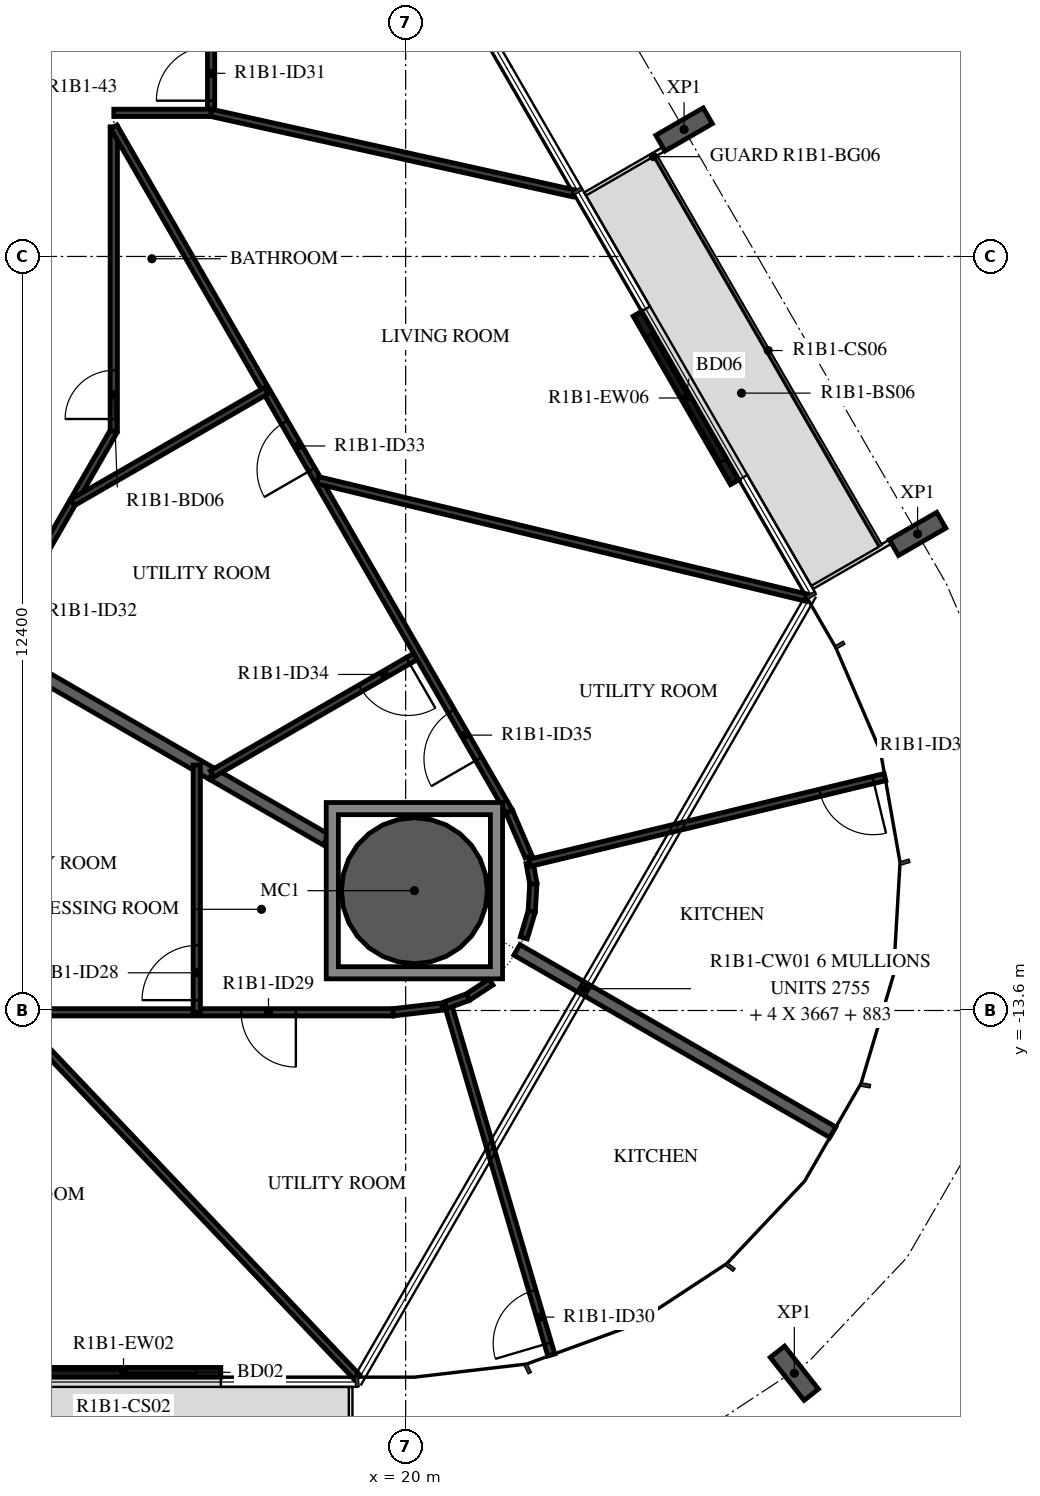
"""IFC4 building model, lengths in metres.
Left out: names, types, materials, properties, quantities, classifications, styles, units other than length and angle.
Written with IfcOpenShell. Run it as: python <this file> out.ifc"""

import sys

from ifc_helpers import new_model, si_unit, direction, frame, frame_2d, origin, origin_2d, place, context, subcontext, project, spatial, polyline, rectangle, hollow_circle, i_section, outline, extrude, element, fill, save


model = new_model("IFC4")
c1 = context("Model", 3, precision=1e-05, world=origin(), true_north=direction((0.0, 1.0)))
c2 = subcontext(c1, "Body", "Model", "MODEL_VIEW")
j1 = project(units=[si_unit("LENGTHUNIT", "METRE"), si_unit("PLANEANGLEUNIT", "RADIAN")], contexts=[c1])
p1 = place(None, origin())
s1 = spatial("IfcSite", under=j1, at=p1, CompositionType="ELEMENT")
p2 = place(p1, origin())
s2 = spatial("IfcBuilding", under=s1, at=p2, CompositionType="ELEMENT")
p3 = place(p2, frame((0.0, 0.0, 48.9)))
s3 = spatial("IfcBuildingStorey", under=s2, at=p3, CompositionType="ELEMENT", Elevation=48.9)
p4 = place(p3, frame((20.144, -11.63, -0.38), z_axis=(0.0, 0.0, 1.0), x_axis=(1.0, 0.0, 0.0)))
e1 = element("IfcColumn", 1, at=p4, inside=s3, PredefinedType="COLUMN", context=c2, shape_type="SweptSolid", body=[
    extrude(hollow_circle(Radius=1.2, WallThickness=0.06, at=origin_2d()), origin(), (0.0, 0.0, 1.0), 3.5),
])
for number, where, z_axis, x_axis in (
    (2, (26.392, -19.565, -0.38), (0.0, 0.0, 1.0), (-0.786, -0.619, 0.0)),
    (3, (28.419, -5.763, -0.38), (0.0, 0.0, 1.0), (0.5, -0.866, 0.0)),
    (4, (24.579, 0.888, -0.38), (0.0, 0.0, 1.0), (0.5, -0.866, 0.0)),
):
    element("IfcColumn", number, at=place(p3, frame(where, z_axis=z_axis, x_axis=x_axis)), inside=s3, PredefinedType="COLUMN", context=c2, shape_type="SweptSolid", body=[
        extrude(i_section(OverallWidth=0.3, OverallDepth=0.9, WebThickness=0.019, FlangeThickness=0.035, FilletRadius=0.03, at=origin_2d()), origin(), (0.0, 0.0, 1.0), 3.5),
    ])
p5 = place(p3, frame((25.411, -4.913, 0.0), z_axis=(0.0, 0.0, 1.0), x_axis=(-0.500028443584, 0.866008981251, 0.0)))
e5 = element("IfcWall", 5, at=p5, inside=s3, PredefinedType="STANDARD", context=c2, shape_type="SweptSolid", body=[
    extrude(rectangle(XDim=3.2, YDim=0.16, at=frame_2d((1.6, 0.0))), origin(), (0.0, 0.0, 1.0), 3.12),
])
p6 = place(p5, frame((0.4, 0.0, 0.0)))
e6 = element("IfcOpeningElement", 6, at=p6, cuts=e5, PredefinedType="OPENING", context=c2, shape_type="SweptSolid", body=[
    extrude(rectangle(XDim=2.4, YDim=2.4, at=frame_2d((1.2, 1.2))), frame((0.0, 0.09, 0.0), z_axis=(0.0, -1.0, 0.0), x_axis=(1.0, 0.0, 0.0)), (0.0, 0.0, 1.0), 0.18),
])
p7 = place(p3, frame((13.76, -19.55, 0.0), z_axis=(0.0, 0.0, 1.0), x_axis=(1.0, 0.0, 0.0)))
e7 = element("IfcWall", 7, at=p7, inside=s3, PredefinedType="STANDARD", context=c2, shape_type="SweptSolid", body=[
    extrude(rectangle(XDim=3.2, YDim=0.16, at=frame_2d((1.6, 0.0))), origin(), (0.0, 0.0, 1.0), 3.12),
])
p8 = place(p7, frame((0.4, 0.0, 0.0)))
e8 = element("IfcOpeningElement", 8, at=p8, cuts=e7, PredefinedType="OPENING", context=c2, shape_type="SweptSolid", body=[
    extrude(rectangle(XDim=2.4, YDim=2.4, at=frame_2d((1.2, 1.2))), frame((0.0, 0.09, 0.0), z_axis=(0.0, -1.0, 0.0), x_axis=(1.0, 0.0, 0.0)), (0.0, 0.0, 1.0), 0.18),
])
p9 = place(p3, frame((16.817, -9.709, 0.0), z_axis=(0.0, 0.0, 1.0), x_axis=(-0.86604338933, 0.499968846828, 0.0)))
e9 = element("IfcWall", 9, at=p9, inside=s3, PredefinedType="STANDARD", context=c2, shape_type="SweptSolid", body=[
    extrude(rectangle(XDim=5.718, YDim=0.2, at=frame_2d((2.859, 0.0))), origin(), (0.0, 0.0, 1.0), 3.12),
])
p10 = place(p3, frame((27.025, -15.603, 0.0), z_axis=(0.0, 0.0, 1.0), x_axis=(-0.866020924479, 0.500007758305, 0.0)))
e10 = element("IfcWall", 10, at=p10, inside=s3, PredefinedType="STANDARD", context=c2, shape_type="SweptSolid", body=[
    extrude(rectangle(XDim=6.0, YDim=0.2, at=frame_2d((3.0, 0.0))), origin(), (0.0, 0.0, 1.0), 3.12),
])
p11 = place(p3, frame((18.694, -10.793, 0.0), z_axis=(0.0, 0.0, 1.0), x_axis=(-0.866009251978, 0.500027974705, 0.0)))
e11 = element("IfcWall", 11, at=p11, inside=s3, PredefinedType="STANDARD", context=c2, shape_type="SweptSolid", body=[
    extrude(rectangle(XDim=2.167, YDim=0.2, at=frame_2d((1.084, 0.0))), origin(), (0.0, 0.0, 1.0), 3.12),
])
p12 = place(p3, frame((11.127, -11.127, 0.0), z_axis=(0.0, 0.0, 1.0), x_axis=(0.499987950692, 0.866032360344, 0.0)))
e12 = element("IfcWall", 12, at=p12, inside=s3, PredefinedType="PARTITIONING", context=c2, shape_type="SweptSolid", body=[
    extrude(rectangle(XDim=8.146, YDim=0.12, at=frame_2d((4.073, 0.0))), origin(), (0.0, 0.0, 1.0), 3.12),
])
p13 = place(p12, frame((1.303, 0.0, 0.0)))
e13 = element("IfcOpeningElement", 13, at=p13, cuts=e12, PredefinedType="OPENING", context=c2, shape_type="SweptSolid", body=[
    extrude(rectangle(XDim=0.9, YDim=2.1, at=frame_2d((0.45, 1.05))), frame((0.0, 0.07, 0.0), z_axis=(0.0, -1.0, 0.0), x_axis=(1.0, 0.0, 0.0)), (0.0, 0.0, 1.0), 0.14),
])
p14 = place(p12, frame((4.273, 0.0, 0.0)))
e14 = element("IfcOpeningElement", 14, at=p14, cuts=e12, PredefinedType="OPENING", context=c2, shape_type="SweptSolid", body=[
    extrude(rectangle(XDim=0.9, YDim=2.1, at=frame_2d((0.45, 1.05))), frame((0.0, 0.07, 0.0), z_axis=(0.0, -1.0, 0.0), x_axis=(1.0, 0.0, 0.0)), (0.0, 0.0, 1.0), 0.14),
])
p15 = place(p3, frame((19.2, -19.63, 0.0), z_axis=(0.0, 0.0, 1.0), x_axis=(-0.688544699396, 0.72519390299, 0.0)))
e15 = element("IfcWall", 15, at=p15, inside=s3, PredefinedType="PARTITIONING", context=c2, shape_type="SweptSolid", body=[
    extrude(rectangle(XDim=8.274, YDim=0.12, at=frame_2d((4.137, 0.0))), origin(), (0.0, 0.0, 1.0), 3.12),
])
p16 = place(p3, frame((19.794, -13.63, 0.0), z_axis=(0.0, 0.0, 1.0), x_axis=(-1.0, 0.0, 0.0)))
e16 = element("IfcWall", 16, at=p16, inside=s3, PredefinedType="PARTITIONING", context=c2, shape_type="SweptSolid", body=[
    extrude(rectangle(XDim=8.116, YDim=0.12, at=frame_2d((4.058, 0.0))), origin(), (0.0, 0.0, 1.0), 3.12),
])
p17 = place(p16, frame((6.436, 0.0, 0.0)))
e17 = element("IfcOpeningElement", 17, at=p17, cuts=e16, PredefinedType="OPENING", context=c2, shape_type="SweptSolid", body=[
    extrude(rectangle(XDim=0.9, YDim=2.1, at=frame_2d((0.45, 1.05))), frame((0.0, 0.07, 0.0), z_axis=(0.0, -1.0, 0.0), x_axis=(1.0, 0.0, 0.0)), (0.0, 0.0, 1.0), 0.14),
])
p18 = place(p16, frame((1.6, 0.0, 0.0)))
e18 = element("IfcOpeningElement", 18, at=p18, cuts=e16, PredefinedType="OPENING", context=c2, shape_type="SweptSolid", body=[
    extrude(rectangle(XDim=0.9, YDim=2.1, at=frame_2d((0.45, 1.05))), frame((0.0, 0.07, 0.0), z_axis=(0.0, -1.0, 0.0), x_axis=(1.0, 0.0, 0.0)), (0.0, 0.0, 1.0), 0.14),
])
p19 = place(p3, frame((22.396, -19.266, 0.0), z_axis=(0.0, 0.0, 1.0), x_axis=(-0.282896205585, 0.959150528783, 0.0)))
e19 = element("IfcWall", 19, at=p19, inside=s3, PredefinedType="PARTITIONING", context=c2, shape_type="SweptSolid", body=[
    extrude(rectangle(XDim=6.012, YDim=0.12, at=frame_2d((3.006, 0.0))), origin(), (0.0, 0.0, 1.0), 3.12),
])
p20 = place(p19, frame((0.2, 0.0, 0.0)))
e20 = element("IfcOpeningElement", 20, at=p20, cuts=e19, PredefinedType="OPENING", context=c2, shape_type="SweptSolid", body=[
    extrude(rectangle(XDim=0.9, YDim=2.1, at=frame_2d((0.45, 1.05))), frame((0.0, 0.07, 0.0), z_axis=(0.0, -1.0, 0.0), x_axis=(1.0, 0.0, 0.0)), (0.0, 0.0, 1.0), 0.14),
])
p21 = place(p3, frame((20.595, -13.536, 0.0), z_axis=(0.0, 0.0, 1.0), x_axis=(-0.993259655268, -0.115910556968, 0.0)))
e21 = element("IfcWall", 21, at=p21, inside=s3, PredefinedType="PARTITIONING", context=c2, shape_type="SweptSolid", body=[
    extrude(rectangle(XDim=0.807, YDim=0.12, at=frame_2d((0.403, 0.0))), origin(), (0.0, 0.0, 1.0), 3.12),
])
p22 = place(p3, frame((16.565, -13.63, 0.0), z_axis=(0.0, 0.0, 1.0), x_axis=(0.0, 1.0, 0.0)))
e22 = element("IfcWall", 22, at=p22, inside=s3, PredefinedType="PARTITIONING", context=c2, shape_type="SweptSolid", body=[
    extrude(rectangle(XDim=4.066, YDim=0.12, at=frame_2d((2.033, 0.0))), origin(), (0.0, 0.0, 1.0), 3.12),
])
p23 = place(p22, frame((0.2, 0.0, 0.0)))
e23 = element("IfcOpeningElement", 23, at=p23, cuts=e22, PredefinedType="OPENING", context=c2, shape_type="SweptSolid", body=[
    extrude(rectangle(XDim=0.9, YDim=2.1, at=frame_2d((0.45, 1.05))), frame((0.0, 0.07, 0.0), z_axis=(0.0, -1.0, 0.0), x_axis=(1.0, 0.0, 0.0)), (0.0, 0.0, 1.0), 0.14),
])
p24 = place(p3, frame((21.403, -13.131, 0.0), z_axis=(0.0, 0.0, 1.0), x_axis=(-0.835339231854, -0.549734815821, 0.0)))
e24 = element("IfcWall", 24, at=p24, inside=s3, PredefinedType="PARTITIONING", context=c2, shape_type="SweptSolid", body=[
    extrude(rectangle(XDim=0.455, YDim=0.12, at=frame_2d((0.228, 0.0))), origin(), (0.0, 0.0, 1.0), 3.12),
])
p25 = place(p3, frame((21.023, -13.381, 0.0), z_axis=(0.0, 0.0, 1.0), x_axis=(-0.939665068469, -0.34209583321, 0.0)))
e25 = element("IfcWall", 25, at=p25, inside=s3, PredefinedType="PARTITIONING", context=c2, shape_type="SweptSolid", body=[
    extrude(rectangle(XDim=0.389, YDim=0.12, at=frame_2d((0.194, 0.0))), origin(), (0.0, 0.0, 1.0), 3.12),
])
p26 = place(p3, frame((16.8, 1.162, 0.0), z_axis=(0.0, 0.0, 1.0), x_axis=(0.0, 1.0, 0.0)))
e26 = element("IfcWall", 26, at=p26, inside=s3, PredefinedType="PARTITIONING", context=c2, shape_type="SweptSolid", body=[
    extrude(rectangle(XDim=1.7, YDim=0.12, at=frame_2d((0.85, 0.0))), origin(), (0.0, 0.0, 1.0), 3.12),
])
p27 = place(p26, frame((0.2, 0.0, 0.0)))
e27 = element("IfcOpeningElement", 27, at=p27, cuts=e26, PredefinedType="OPENING", context=c2, shape_type="SweptSolid", body=[
    extrude(rectangle(XDim=0.9, YDim=2.1, at=frame_2d((0.45, 1.05))), frame((0.0, 0.07, 0.0), z_axis=(0.0, -1.0, 0.0), x_axis=(1.0, 0.0, 0.0)), (0.0, 0.0, 1.0), 0.14),
])
p28 = place(p3, frame((15.2, -4.073, 0.0), z_axis=(0.0, 0.0, 1.0), x_axis=(0.0, 1.0, 0.0)))
e28 = element("IfcWall", 28, at=p28, inside=s3, PredefinedType="PARTITIONING", context=c2, shape_type="SweptSolid", body=[
    extrude(rectangle(XDim=5.005, YDim=0.12, at=frame_2d((2.503, 0.0))), origin(), (0.0, 0.0, 1.0), 3.12),
])
p29 = place(p28, frame((0.2, 0.0, 0.0)))
e29 = element("IfcOpeningElement", 29, at=p29, cuts=e28, PredefinedType="OPENING", context=c2, shape_type="SweptSolid", body=[
    extrude(rectangle(XDim=0.8, YDim=2.1, at=frame_2d((0.4, 1.05))), frame((0.0, 0.07, 0.0), z_axis=(0.0, -1.0, 0.0), x_axis=(1.0, 0.0, 0.0)), (0.0, 0.0, 1.0), 0.14),
])
p30 = place(p3, frame((15.2, 1.162, 0.0), z_axis=(0.0, 0.0, 1.0), x_axis=(1.0, 0.0, 0.0)))
e30 = element("IfcWall", 30, at=p30, inside=s3, PredefinedType="PARTITIONING", context=c2, shape_type="SweptSolid", body=[
    extrude(rectangle(XDim=1.6, YDim=0.12, at=frame_2d((0.8, 0.0))), origin(), (0.0, 0.0, 1.0), 3.12),
])
p31 = place(p3, frame((16.8, 1.162, 0.0), z_axis=(0.0, 0.0, 1.0), x_axis=(0.976218101949, -0.216790722652, 0.0)))
e31 = element("IfcWall", 31, at=p31, inside=s3, PredefinedType="PARTITIONING", context=c2, shape_type="SweptSolid", body=[
    extrude(rectangle(XDim=6.105, YDim=0.12, at=frame_2d((3.052, 0.0))), origin(), (0.0, 0.0, 1.0), 3.12),
])
p32 = place(p3, frame((21.942, -12.406, 0.0), z_axis=(0.0, 0.0, 1.0), x_axis=(0.287101711529, 0.957900102953, 0.0)))
e32 = element("IfcWall", 32, at=p32, inside=s3, PredefinedType="PARTITIONING", context=c2, shape_type="SweptSolid", body=[
    extrude(rectangle(XDim=0.455, YDim=0.12, at=frame_2d((0.228, 0.0))), origin(), (0.0, 0.0, 1.0), 3.12),
])
p33 = place(p3, frame((22.073, -11.97, 0.0), z_axis=(0.0, 0.0, 1.0), x_axis=(0.058533144572, 0.998285465679, 0.0)))
e33 = element("IfcWall", 33, at=p33, inside=s3, PredefinedType="PARTITIONING", context=c2, shape_type="SweptSolid", body=[
    extrude(rectangle(XDim=0.455, YDim=0.12, at=frame_2d((0.227, 0.0))), origin(), (0.0, 0.0, 1.0), 3.12),
])
p34 = place(p3, frame((22.1, -11.516, 0.0), z_axis=(0.0, 0.0, 1.0), x_axis=(-0.174264410128, 0.984698895786, 0.0)))
e34 = element("IfcWall", 34, at=p34, inside=s3, PredefinedType="PARTITIONING", context=c2, shape_type="SweptSolid", body=[
    extrude(rectangle(XDim=0.349, YDim=0.12, at=frame_2d((0.174, 0.0))), origin(), (0.0, 0.0, 1.0), 3.12),
])
p35 = place(p3, frame((20.212, -7.749, 0.0), z_axis=(0.0, 0.0, 1.0), x_axis=(-0.86604663799, -0.499963219473, 0.0)))
e35 = element("IfcWall", 35, at=p35, inside=s3, PredefinedType="PARTITIONING", context=c2, shape_type="SweptSolid", body=[
    extrude(rectangle(XDim=3.921, YDim=0.12, at=frame_2d((1.96, 0.0))), origin(), (0.0, 0.0, 1.0), 3.12),
])
p36 = place(p35, frame((0.2, 0.0, 0.0)))
e36 = element("IfcOpeningElement", 36, at=p36, cuts=e35, PredefinedType="OPENING", context=c2, shape_type="SweptSolid", body=[
    extrude(rectangle(XDim=0.9, YDim=2.1, at=frame_2d((0.45, 1.05))), frame((0.0, 0.07, 0.0), z_axis=(0.0, -1.0, 0.0), x_axis=(1.0, 0.0, 0.0)), (0.0, 0.0, 1.0), 0.14),
])
p37 = place(p3, frame((22.021, -11.068, 0.0), z_axis=(0.0, 0.0, 1.0), x_axis=(-0.396036092975, 0.918234944369, 0.0)))
e37 = element("IfcWall", 37, at=p37, inside=s3, PredefinedType="PARTITIONING", context=c2, shape_type="SweptSolid", body=[
    extrude(rectangle(XDim=0.807, YDim=0.12, at=frame_2d((0.403, 0.0))), origin(), (0.0, 0.0, 1.0), 3.12),
])
p38 = place(p3, frame((21.701, -10.327, 0.0), z_axis=(0.0, 0.0, 1.0), x_axis=(-0.500008528526, 0.866020479782, 0.0)))
e38 = element("IfcWall", 38, at=p38, inside=s3, PredefinedType="PARTITIONING", context=c2, shape_type="SweptSolid", body=[
    extrude(rectangle(XDim=13.002, YDim=0.12, at=frame_2d((6.501, 0.0))), origin(), (0.0, 0.0, 1.0), 3.12),
])
p39 = place(p38, frame((6.49, 0.0, 0.0)))
e39 = element("IfcOpeningElement", 39, at=p39, cuts=e38, PredefinedType="OPENING", context=c2, shape_type="SweptSolid", body=[
    extrude(rectangle(XDim=0.9, YDim=2.1, at=frame_2d((0.45, 1.05))), frame((0.0, 0.07, 0.0), z_axis=(0.0, -1.0, 0.0), x_axis=(1.0, 0.0, 0.0)), (0.0, 0.0, 1.0), 0.14),
])
p40 = place(p38, frame((1.0, 0.0, 0.0)))
e40 = element("IfcOpeningElement", 40, at=p40, cuts=e38, PredefinedType="OPENING", context=c2, shape_type="SweptSolid", body=[
    extrude(rectangle(XDim=0.9, YDim=2.1, at=frame_2d((0.45, 1.05))), frame((0.0, 0.07, 0.0), z_axis=(0.0, -1.0, 0.0), x_axis=(1.0, 0.0, 0.0)), (0.0, 0.0, 1.0), 0.14),
])
p41 = place(p3, frame((27.883, -9.762, 0.0), z_axis=(0.0, 0.0, 1.0), x_axis=(-0.972090512558, -0.234606128213, 0.0)))
e41 = element("IfcWall", 41, at=p41, inside=s3, PredefinedType="PARTITIONING", context=c2, shape_type="SweptSolid", body=[
    extrude(rectangle(XDim=6.012, YDim=0.12, at=frame_2d((3.006, 0.0))), origin(), (0.0, 0.0, 1.0), 3.12),
])
p42 = place(p41, frame((0.2, 0.0, 0.0)))
e42 = element("IfcOpeningElement", 42, at=p42, cuts=e41, PredefinedType="OPENING", context=c2, shape_type="SweptSolid", body=[
    extrude(rectangle(XDim=0.9, YDim=2.1, at=frame_2d((0.45, 1.05))), frame((0.0, 0.07, 0.0), z_axis=(0.0, -1.0, 0.0), x_axis=(1.0, 0.0, 0.0)), (0.0, 0.0, 1.0), 0.14),
])
p43 = place(p3, frame((17.706, -3.408, 0.0), z_axis=(0.0, 0.0, 1.0), x_axis=(-0.866027421574, -0.49999650507, 0.0)))
e43 = element("IfcWall", 43, at=p43, inside=s3, PredefinedType="PARTITIONING", context=c2, shape_type="SweptSolid", body=[
    extrude(rectangle(XDim=3.676, YDim=0.12, at=frame_2d((1.838, 0.0))), origin(), (0.0, 0.0, 1.0), 3.12),
])
p44 = place(p3, frame((26.6, -6.813, 0.0), z_axis=(0.0, 0.0, 1.0), x_axis=(-0.972306888212, 0.233707755831, 0.0)))
e44 = element("IfcWall", 44, at=p44, inside=s3, PredefinedType="PARTITIONING", context=c2, shape_type="SweptSolid", body=[
    extrude(rectangle(XDim=8.273, YDim=0.12, at=frame_2d((4.137, 0.0))), origin(), (0.0, 0.0, 1.0), 3.12),
])
p45 = place(p3, origin())
e45 = element("IfcWall", 45, at=p45, inside=s3, PredefinedType="STANDARD", context=c2, shape_type="SweptSolid", body=[
    extrude(outline(polyline([(21.594, -10.18), (21.594, -13.08), (18.694, -13.08), (18.694, -10.18), (21.594, -10.18)]), holes=[polyline([(18.894, -12.88), (21.394, -12.88), (21.394, -10.38), (18.894, -10.38), (18.894, -12.88)])]), origin(), (0.0, 0.0, 1.0), 3.12),
])
p46 = place(p6, origin())
e46 = element("IfcDoor", 46, at=p46, inside=s3, OperationType="DOUBLE_DOOR_SLIDING", PredefinedType="DOOR", context=c2, shape_type="SweptSolid", body=[
    extrude(rectangle(XDim=2.4, YDim=2.4, at=frame_2d((1.2, 1.2))), frame((0.0, 0.025, 0.0), z_axis=(0.0, -1.0, 0.0), x_axis=(1.0, 0.0, 0.0)), (0.0, 0.0, 1.0), 0.05),
])
fill(e6, e46)
p47 = place(p8, origin())
e47 = element("IfcDoor", 47, at=p47, inside=s3, OperationType="DOUBLE_DOOR_SLIDING", PredefinedType="DOOR", context=c2, shape_type="SweptSolid", body=[
    extrude(rectangle(XDim=2.4, YDim=2.4, at=frame_2d((1.2, 1.2))), frame((0.0, 0.025, 0.0), z_axis=(0.0, -1.0, 0.0), x_axis=(1.0, 0.0, 0.0)), (0.0, 0.0, 1.0), 0.05),
])
fill(e8, e47)
p48 = place(p23, origin())
e48 = element("IfcDoor", 48, at=p48, inside=s3, OperationType="SINGLE_SWING_RIGHT", PredefinedType="DOOR", context=c2, shape_type="SweptSolid", body=[
    extrude(rectangle(XDim=0.9, YDim=2.1, at=frame_2d((0.45, 1.05))), frame((0.0, 0.025, 0.0), z_axis=(0.0, -1.0, 0.0), x_axis=(1.0, 0.0, 0.0)), (0.0, 0.0, 1.0), 0.05),
])
fill(e23, e48)
p49 = place(p18, origin())
e49 = element("IfcDoor", 49, at=p49, inside=s3, OperationType="SINGLE_SWING_RIGHT", PredefinedType="DOOR", context=c2, shape_type="SweptSolid", body=[
    extrude(rectangle(XDim=0.9, YDim=2.1, at=frame_2d((0.45, 1.05))), frame((0.0, 0.025, 0.0), z_axis=(0.0, -1.0, 0.0), x_axis=(1.0, 0.0, 0.0)), (0.0, 0.0, 1.0), 0.05),
])
fill(e18, e49)
p50 = place(p20, origin())
e50 = element("IfcDoor", 50, at=p50, inside=s3, OperationType="SINGLE_SWING_RIGHT", PredefinedType="DOOR", context=c2, shape_type="SweptSolid", body=[
    extrude(rectangle(XDim=0.9, YDim=2.1, at=frame_2d((0.45, 1.05))), frame((0.0, 0.025, 0.0), z_axis=(0.0, -1.0, 0.0), x_axis=(1.0, 0.0, 0.0)), (0.0, 0.0, 1.0), 0.05),
])
fill(e20, e50)
p51 = place(p27, origin())
e51 = element("IfcDoor", 51, at=p51, inside=s3, OperationType="SINGLE_SWING_LEFT", PredefinedType="DOOR", context=c2, shape_type="SweptSolid", body=[
    extrude(rectangle(XDim=0.9, YDim=2.1, at=frame_2d((0.45, 1.05))), frame((0.0, 0.025, 0.0), z_axis=(0.0, -1.0, 0.0), x_axis=(1.0, 0.0, 0.0)), (0.0, 0.0, 1.0), 0.05),
])
fill(e27, e51)
p52 = place(p29, origin())
e52 = element("IfcDoor", 52, at=p52, inside=s3, OperationType="SINGLE_SWING_LEFT", PredefinedType="DOOR", context=c2, shape_type="SweptSolid", body=[
    extrude(rectangle(XDim=0.8, YDim=2.1, at=frame_2d((0.4, 1.05))), frame((0.0, 0.025, 0.0), z_axis=(0.0, -1.0, 0.0), x_axis=(1.0, 0.0, 0.0)), (0.0, 0.0, 1.0), 0.05),
])
fill(e29, e52)
p53 = place(p39, origin())
e53 = element("IfcDoor", 53, at=p53, inside=s3, OperationType="SINGLE_SWING_LEFT", PredefinedType="DOOR", context=c2, shape_type="SweptSolid", body=[
    extrude(rectangle(XDim=0.9, YDim=2.1, at=frame_2d((0.45, 1.05))), frame((0.0, 0.025, 0.0), z_axis=(0.0, -1.0, 0.0), x_axis=(1.0, 0.0, 0.0)), (0.0, 0.0, 1.0), 0.05),
])
fill(e39, e53)
p54 = place(p36, origin())
e54 = element("IfcDoor", 54, at=p54, inside=s3, OperationType="SINGLE_SWING_LEFT", PredefinedType="DOOR", context=c2, shape_type="SweptSolid", body=[
    extrude(rectangle(XDim=0.9, YDim=2.1, at=frame_2d((0.45, 1.05))), frame((0.0, 0.025, 0.0), z_axis=(0.0, -1.0, 0.0), x_axis=(1.0, 0.0, 0.0)), (0.0, 0.0, 1.0), 0.05),
])
fill(e36, e54)
p55 = place(p40, origin())
e55 = element("IfcDoor", 55, at=p55, inside=s3, OperationType="SINGLE_SWING_LEFT", PredefinedType="DOOR", context=c2, shape_type="SweptSolid", body=[
    extrude(rectangle(XDim=0.9, YDim=2.1, at=frame_2d((0.45, 1.05))), frame((0.0, 0.025, 0.0), z_axis=(0.0, -1.0, 0.0), x_axis=(1.0, 0.0, 0.0)), (0.0, 0.0, 1.0), 0.05),
])
fill(e40, e55)
p56 = place(p42, origin())
e56 = element("IfcDoor", 56, at=p56, inside=s3, OperationType="SINGLE_SWING_LEFT", PredefinedType="DOOR", context=c2, shape_type="SweptSolid", body=[
    extrude(rectangle(XDim=0.9, YDim=2.1, at=frame_2d((0.45, 1.05))), frame((0.0, 0.025, 0.0), z_axis=(0.0, -1.0, 0.0), x_axis=(1.0, 0.0, 0.0)), (0.0, 0.0, 1.0), 0.05),
])
fill(e42, e56)
save(model, sys.argv[1])
